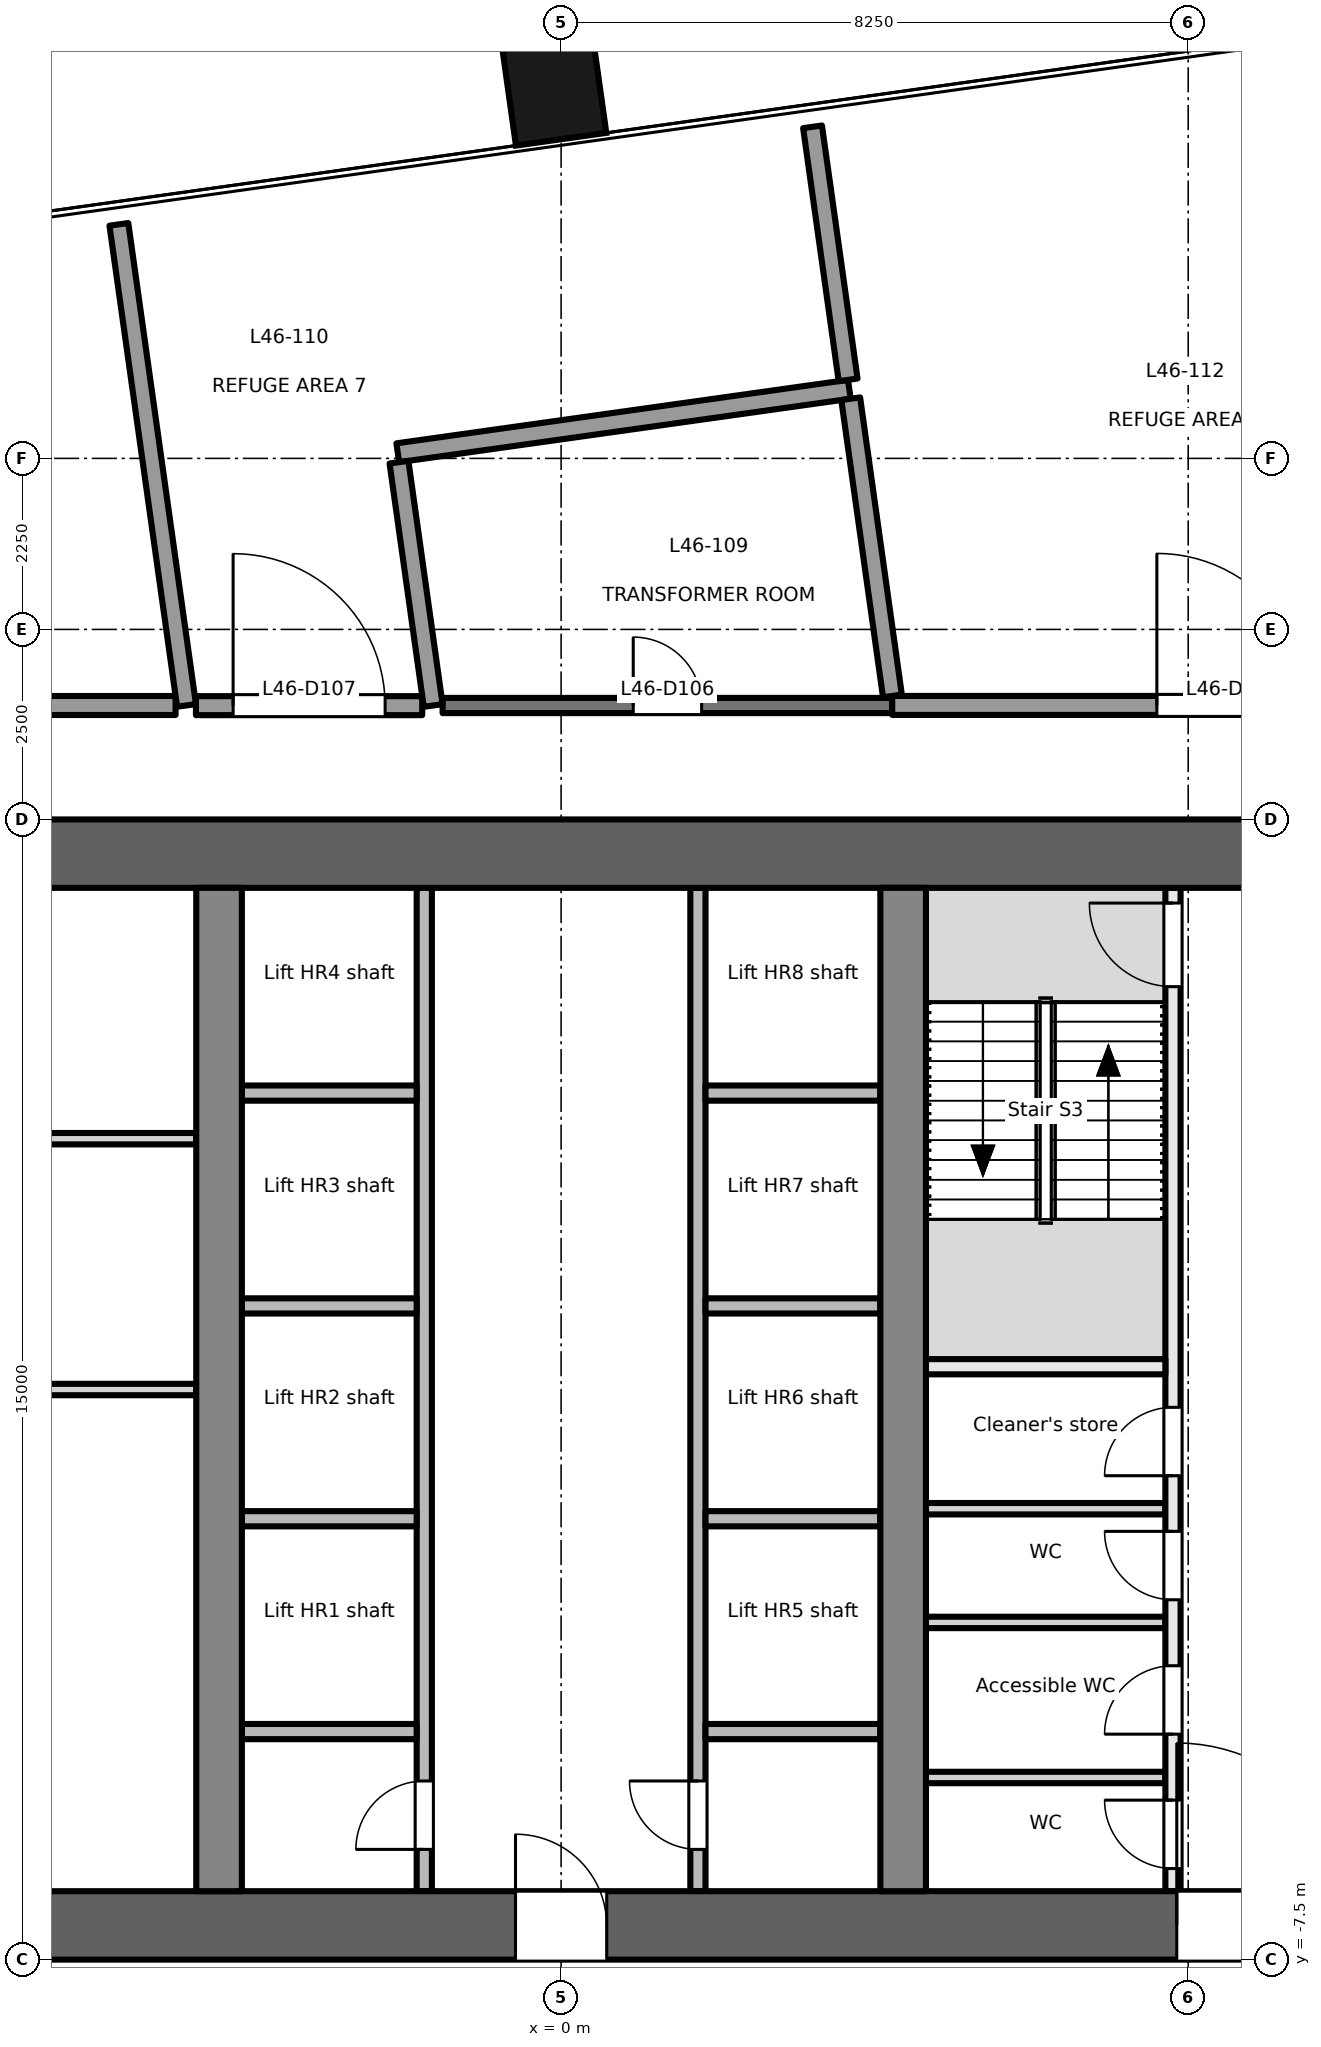
"""IFC4 building model, lengths in metres.
Left out: names, types, materials, properties, quantities, classifications, styles, units other than length and angle.
Written with IfcOpenShell. Run it as: python <this file> out.ifc"""

import sys

from ifc_helpers import new_model, si_unit, direction, frame, frame_2d, origin, origin_2d, place, context, subcontext, project, spatial, rectangle, extrude, element, fill, save


model = new_model("IFC4")
c1 = context("Model", 3, precision=1e-05, world=origin(), true_north=direction((0.0, 1.0)))
c2 = subcontext(c1, "Body", "Model", "MODEL_VIEW")
j1 = project(units=[si_unit("LENGTHUNIT", "METRE"), si_unit("PLANEANGLEUNIT", "RADIAN")], contexts=[c1])
p1 = place(None, origin())
s1 = spatial("IfcSite", under=j1, at=p1, CompositionType="ELEMENT")
p2 = place(p1, origin())
s2 = spatial("IfcBuilding", under=s1, at=p2, CompositionType="ELEMENT")
p3 = place(p2, frame((0.0, 0.0, 199.7)))
s3 = spatial("IfcBuildingStorey", under=s2, at=p3, CompositionType="ELEMENT", Elevation=199.7)
p4 = place(p3, frame((-0.125, 17.34, -0.2), z_axis=(0.0, 0.0, 1.0), x_axis=(0.99027049762, 0.139155817501, 0.0)))
e1 = element("IfcColumn", 1, at=p4, inside=s3, PredefinedType="COLUMN", context=c2, shape_type="SweptSolid", body=[
    extrude(rectangle(XDim=1.2, YDim=1.8, at=origin_2d()), origin(), (0.0, 0.0, 1.0), 8.4),
])
p5 = place(p3, frame((-18.0, -7.05, -0.2), z_axis=(0.0, 0.0, 1.0), x_axis=(1.0, 0.0, 0.0)))
e2 = element("IfcWall", 2, at=p5, inside=s3, PredefinedType="SHEAR", context=c2, shape_type="SweptSolid", body=[
    extrude(rectangle(XDim=36.0, YDim=0.9, at=frame_2d((18.0, 0.0))), origin(), (0.0, 0.0, 1.0), 8.4),
])
p6 = place(p5, frame((4.9, 0.0, 0.2)))
e3 = element("IfcOpeningElement", 3, at=p6, cuts=e2, PredefinedType="OPENING", context=c2, shape_type="SweptSolid", body=[
    extrude(rectangle(XDim=1.8, YDim=2.1, at=frame_2d((0.9, 1.05))), frame((0.0, 0.46, 0.0), z_axis=(0.0, -1.0, 0.0), x_axis=(1.0, 0.0, 0.0)), (0.0, 0.0, 1.0), 0.921),
])
p7 = place(p5, frame((17.4, 0.0, 0.2)))
e4 = element("IfcOpeningElement", 4, at=p7, cuts=e2, PredefinedType="OPENING", context=c2, shape_type="SweptSolid", body=[
    extrude(rectangle(XDim=1.2, YDim=2.1, at=frame_2d((0.6, 1.05))), frame((0.0, 0.46, 0.0), z_axis=(0.0, -1.0, 0.0), x_axis=(1.0, 0.0, 0.0)), (0.0, 0.0, 1.0), 0.921),
])
p8 = place(p5, frame((26.1, 0.0, 0.2)))
e5 = element("IfcOpeningElement", 5, at=p8, cuts=e2, PredefinedType="OPENING", context=c2, shape_type="SweptSolid", body=[
    extrude(rectangle(XDim=2.4, YDim=2.1, at=frame_2d((1.2, 1.05))), frame((0.0, 0.46, 0.0), z_axis=(0.0, -1.0, 0.0), x_axis=(1.0, 0.0, 0.0)), (0.0, 0.0, 1.0), 0.921),
])
p9 = place(p3, frame((-18.0, 7.05, -0.2), z_axis=(0.0, 0.0, 1.0), x_axis=(1.0, 0.0, 0.0)))
e6 = element("IfcWall", 6, at=p9, inside=s3, PredefinedType="SHEAR", context=c2, shape_type="SweptSolid", body=[
    extrude(rectangle(XDim=36.0, YDim=0.9, at=frame_2d((18.0, 0.0))), origin(), (0.0, 0.0, 1.0), 8.4),
])
for number, where, z_axis, x_axis in (
    (7, (-4.5, -6.6, -0.2), (0.0, 0.0, 1.0), (0.0, 1.0, 0.0)),
    (8, (4.5, -6.6, -0.2), (0.0, 0.0, 1.0), (0.0, 1.0, 0.0)),
):
    element("IfcWall", number, at=place(p3, frame(where, z_axis=z_axis, x_axis=x_axis)), inside=s3, PredefinedType="SHEAR", context=c2, shape_type="SweptSolid", body=[
        extrude(rectangle(XDim=13.2, YDim=0.6, at=frame_2d((6.6, 0.0))), origin(), (0.0, 0.0, 1.0), 8.4),
    ])
for number, where, z_axis, x_axis in (
    (9, (-11.05, 0.0, 0.0), (0.0, 0.0, 1.0), (1.0, 0.0, 0.0)),
    (10, (-11.05, 3.3, 0.0), (0.0, 0.0, 1.0), (1.0, 0.0, 0.0)),
):
    element("IfcWall", number, at=place(p3, frame(where, z_axis=z_axis, x_axis=x_axis)), inside=s3, PredefinedType="PARTITIONING", context=c2, shape_type="SweptSolid", body=[
        extrude(rectangle(XDim=6.25, YDim=0.15, at=frame_2d((3.125, 0.0))), origin(), (0.0, 0.0, 1.0), 8.2),
    ])
p10 = place(p3, frame((-1.8, -6.6, 0.0), z_axis=(0.0, 0.0, 1.0), x_axis=(0.0, 1.0, 0.0)))
e11 = element("IfcWall", 11, at=p10, inside=s3, PredefinedType="PARTITIONING", context=c2, shape_type="SweptSolid", body=[
    extrude(rectangle(XDim=13.2, YDim=0.2, at=frame_2d((6.6, 0.0))), origin(), (0.0, 0.0, 1.0), 8.2),
])
p11 = place(p10, frame((0.55, 0.0, 0.0)))
e12 = element("IfcOpeningElement", 12, at=p11, cuts=e11, PredefinedType="OPENING", context=c2, shape_type="SweptSolid", body=[
    extrude(rectangle(XDim=0.9, YDim=2.1, at=frame_2d((0.45, 1.05))), frame((0.0, 0.111, 0.0), z_axis=(0.0, -1.0, 0.0), x_axis=(1.0, 0.0, 0.0)), (0.0, 0.0, 1.0), 0.221),
])
p12 = place(p3, frame((1.8, -6.6, 0.0), z_axis=(0.0, 0.0, 1.0), x_axis=(0.0, 1.0, 0.0)))
e13 = element("IfcWall", 13, at=p12, inside=s3, PredefinedType="PARTITIONING", context=c2, shape_type="SweptSolid", body=[
    extrude(rectangle(XDim=13.2, YDim=0.2, at=frame_2d((6.6, 0.0))), origin(), (0.0, 0.0, 1.0), 8.2),
])
p13 = place(p12, frame((0.55, 0.0, 0.0)))
e14 = element("IfcOpeningElement", 14, at=p13, cuts=e13, PredefinedType="OPENING", context=c2, shape_type="SweptSolid", body=[
    extrude(rectangle(XDim=0.9, YDim=2.1, at=frame_2d((0.45, 1.05))), frame((0.0, 0.111, 0.0), z_axis=(0.0, -1.0, 0.0), x_axis=(1.0, 0.0, 0.0)), (0.0, 0.0, 1.0), 0.221),
])
for number, where, z_axis, x_axis in (
    (15, (-4.2, -1.7, 0.0), (0.0, 0.0, 1.0), (1.0, 0.0, 0.0)),
    (16, (-4.2, 1.1, 0.0), (0.0, 0.0, 1.0), (1.0, 0.0, 0.0)),
    (17, (-4.2, 3.9, 0.0), (0.0, 0.0, 1.0), (1.0, 0.0, 0.0)),
    (18, (-4.2, -4.5, 0.0), (0.0, 0.0, 1.0), (1.0, 0.0, 0.0)),
    (19, (1.9, -1.7, 0.0), (0.0, 0.0, 1.0), (1.0, 0.0, 0.0)),
    (20, (1.9, 1.1, 0.0), (0.0, 0.0, 1.0), (1.0, 0.0, 0.0)),
    (21, (1.9, 3.9, 0.0), (0.0, 0.0, 1.0), (1.0, 0.0, 0.0)),
    (22, (1.9, -4.5, 0.0), (0.0, 0.0, 1.0), (1.0, 0.0, 0.0)),
):
    element("IfcWall", number, at=place(p3, frame(where, z_axis=z_axis, x_axis=x_axis)), inside=s3, PredefinedType="PARTITIONING", context=c2, shape_type="SweptSolid", body=[
        extrude(rectangle(XDim=2.3, YDim=0.2, at=frame_2d((1.15, 0.0))), origin(), (0.0, 0.0, 1.0), 8.2),
    ])
p14 = place(p3, frame((8.05, -6.6, 0.0), z_axis=(0.0, 0.0, 1.0), x_axis=(0.0, 1.0, 0.0)))
e23 = element("IfcWall", 23, at=p14, inside=s3, PredefinedType="PARTITIONING", context=c2, shape_type="SweptSolid", body=[
    extrude(rectangle(XDim=13.2, YDim=0.2, at=frame_2d((6.6, 0.0))), origin(), (0.0, 0.0, 1.0), 8.2),
])
p15 = place(p14, frame((0.298, 0.0, 0.0)))
e24 = element("IfcOpeningElement", 24, at=p15, cuts=e23, PredefinedType="OPENING", context=c2, shape_type="SweptSolid", body=[
    extrude(rectangle(XDim=0.9, YDim=2.1, at=frame_2d((0.45, 1.05))), frame((0.0, 0.111, 0.0), z_axis=(0.0, -1.0, 0.0), x_axis=(1.0, 0.0, 0.0)), (0.0, 0.0, 1.0), 0.221),
])
p16 = place(p14, frame((2.066, 0.0, 0.0)))
e25 = element("IfcOpeningElement", 25, at=p16, cuts=e23, PredefinedType="OPENING", context=c2, shape_type="SweptSolid", body=[
    extrude(rectangle(XDim=0.9, YDim=2.1, at=frame_2d((0.45, 1.05))), frame((0.0, 0.111, 0.0), z_axis=(0.0, -1.0, 0.0), x_axis=(1.0, 0.0, 0.0)), (0.0, 0.0, 1.0), 0.221),
])
p17 = place(p14, frame((3.834, 0.0, 0.0)))
e26 = element("IfcOpeningElement", 26, at=p17, cuts=e23, PredefinedType="OPENING", context=c2, shape_type="SweptSolid", body=[
    extrude(rectangle(XDim=0.9, YDim=2.1, at=frame_2d((0.45, 1.05))), frame((0.0, 0.111, 0.0), z_axis=(0.0, -1.0, 0.0), x_axis=(1.0, 0.0, 0.0)), (0.0, 0.0, 1.0), 0.221),
])
p18 = place(p14, frame((5.466, 0.0, 0.0)))
e27 = element("IfcOpeningElement", 27, at=p18, cuts=e23, PredefinedType="OPENING", context=c2, shape_type="SweptSolid", body=[
    extrude(rectangle(XDim=0.9, YDim=2.1, at=frame_2d((0.45, 1.05))), frame((0.0, 0.111, 0.0), z_axis=(0.0, -1.0, 0.0), x_axis=(1.0, 0.0, 0.0)), (0.0, 0.0, 1.0), 0.221),
])
p19 = place(p14, frame((11.9, 0.0, 0.0)))
e28 = element("IfcOpeningElement", 28, at=p19, cuts=e23, PredefinedType="OPENING", context=c2, shape_type="SweptSolid", body=[
    extrude(rectangle(XDim=1.1, YDim=2.1, at=frame_2d((0.55, 1.05))), frame((0.0, 0.111, 0.0), z_axis=(0.0, -1.0, 0.0), x_axis=(1.0, 0.0, 0.0)), (0.0, 0.0, 1.0), 0.221),
])
p20 = place(p3, frame((4.8, 0.3, 0.0), z_axis=(0.0, 0.0, 1.0), x_axis=(1.0, 0.0, 0.0)))
e29 = element("IfcWall", 29, at=p20, inside=s3, PredefinedType="PARTITIONING", context=c2, shape_type="SweptSolid", body=[
    extrude(rectangle(XDim=3.15, YDim=0.2, at=frame_2d((1.575, 0.0))), origin(), (0.0, 0.0, 1.0), 8.2),
])
for number, where, z_axis, x_axis in (
    (30, (4.8, -5.104, 0.0), (0.0, 0.0, 1.0), (1.0, 0.0, 0.0)),
    (31, (4.8, -3.064, 0.0), (0.0, 0.0, 1.0), (1.0, 0.0, 0.0)),
    (32, (4.8, -1.568, 0.0), (0.0, 0.0, 1.0), (1.0, 0.0, 0.0)),
):
    element("IfcWall", number, at=place(p3, frame(where, z_axis=z_axis, x_axis=x_axis)), inside=s3, PredefinedType="PARTITIONING", context=c2, shape_type="SweptSolid", body=[
        extrude(rectangle(XDim=3.15, YDim=0.15, at=frame_2d((1.575, 0.0))), origin(), (0.0, 0.0, 1.0), 8.2),
    ])
p21 = place(p3, frame((-11.112, 8.999, 0.0), z_axis=(0.0, 0.0, 1.0), x_axis=(1.0, 0.0, 0.0)))
e33 = element("IfcWall", 33, at=p21, inside=s3, PredefinedType="PARTITIONING", context=c2, shape_type="SweptSolid", body=[
    extrude(rectangle(XDim=6.04, YDim=0.25, at=frame_2d((3.02, 0.0))), origin(), (0.0, 0.0, 1.0), 7.9),
])
p22 = place(p21, frame((2.02, 0.0, 0.0)))
e34 = element("IfcOpeningElement", 34, at=p22, cuts=e33, PredefinedType="OPENING", context=c2, shape_type="SweptSolid", body=[
    extrude(rectangle(XDim=2.0, YDim=2.1, at=frame_2d((1.0, 1.05))), frame((0.0, 0.135, 0.0), z_axis=(0.0, -1.0, 0.0), x_axis=(1.0, 0.0, 0.0)), (0.0, 0.0, 1.0), 0.271),
])
p23 = place(p3, frame((-1.559, 8.999, 0.0), z_axis=(0.0, 0.0, 1.0), x_axis=(1.0, 0.0, 0.0)))
e35 = element("IfcWall", 35, at=p23, inside=s3, PredefinedType="PARTITIONING", context=c2, shape_type="SweptSolid", body=[
    extrude(rectangle(XDim=5.915, YDim=0.2, at=frame_2d((2.958, 0.0))), origin(), (0.0, 0.0, 1.0), 7.9),
])
p24 = place(p23, frame((2.508, 0.0, 0.0)))
e36 = element("IfcOpeningElement", 36, at=p24, cuts=e35, PredefinedType="OPENING", context=c2, shape_type="SweptSolid", body=[
    extrude(rectangle(XDim=0.9, YDim=2.1, at=frame_2d((0.45, 1.05))), frame((0.0, 0.111, 0.0), z_axis=(0.0, -1.0, 0.0), x_axis=(1.0, 0.0, 0.0)), (0.0, 0.0, 1.0), 0.221),
])
p25 = place(p3, frame((-4.804, 8.997, 0.0), z_axis=(0.0, 0.0, 1.0), x_axis=(1.0, 0.0, 0.0)))
e37 = element("IfcWall", 37, at=p25, inside=s3, PredefinedType="PARTITIONING", context=c2, shape_type="SweptSolid", body=[
    extrude(rectangle(XDim=2.977, YDim=0.25, at=frame_2d((1.489, 0.0))), origin(), (0.0, 0.0, 1.0), 7.9),
])
p26 = place(p25, frame((0.489, 0.0, 0.0)))
e38 = element("IfcOpeningElement", 38, at=p26, cuts=e37, PredefinedType="OPENING", context=c2, shape_type="SweptSolid", body=[
    extrude(rectangle(XDim=2.0, YDim=2.1, at=frame_2d((1.0, 1.05))), frame((0.0, 0.135, 0.0), z_axis=(0.0, -1.0, 0.0), x_axis=(1.0, 0.0, 0.0)), (0.0, 0.0, 1.0), 0.271),
])
p27 = place(p3, frame((4.356, 9.0, 0.0), z_axis=(0.0, 0.0, 1.0), x_axis=(1.0, 0.0, 0.0)))
e39 = element("IfcWall", 39, at=p27, inside=s3, PredefinedType="PARTITIONING", context=c2, shape_type="SweptSolid", body=[
    extrude(rectangle(XDim=8.965, YDim=0.25, at=frame_2d((4.482, 0.0))), origin(), (0.0, 0.0, 1.0), 7.84),
])
p28 = place(p27, frame((3.482, 0.0, 0.0)))
e40 = element("IfcOpeningElement", 40, at=p28, cuts=e39, PredefinedType="OPENING", context=c2, shape_type="SweptSolid", body=[
    extrude(rectangle(XDim=2.0, YDim=2.1, at=frame_2d((1.0, 1.05))), frame((0.0, 0.135, 0.0), z_axis=(0.0, -1.0, 0.0), x_axis=(1.0, 0.0, 0.0)), (0.0, 0.0, 1.0), 0.271),
])
p29 = place(p3, frame((-5.818, 15.329, 0.0), z_axis=(0.0, 0.0, 1.0), x_axis=(0.139271219089, -0.990254274181, 0.0)))
e41 = element("IfcWall", 41, at=p29, inside=s3, PredefinedType="PARTITIONING", context=c2, shape_type="SweptSolid", body=[
    extrude(rectangle(XDim=6.391, YDim=0.25, at=frame_2d((3.196, 0.0))), origin(), (0.0, 0.0, 1.0), 7.1),
])
p30 = place(p3, frame((-2.149, 12.324, 0.0), z_axis=(0.0, 0.0, 1.0), x_axis=(0.990267623823, 0.139176266683, 0.0)))
e42 = element("IfcWall", 42, at=p30, inside=s3, PredefinedType="PARTITIONING", context=c2, shape_type="SweptSolid", body=[
    extrude(rectangle(XDim=5.999, YDim=0.25, at=frame_2d((3.0, 0.0))), origin(), (0.0, 0.0, 1.0), 6.15),
])
p31 = place(p3, frame((-1.683, 8.999, 0.0), z_axis=(0.0, 0.0, 1.0), x_axis=(-0.13920043999, 0.990264226107, 0.0)))
e43 = element("IfcWall", 43, at=p31, inside=s3, PredefinedType="PARTITIONING", context=c2, shape_type="SweptSolid", body=[
    extrude(rectangle(XDim=3.232, YDim=0.25, at=frame_2d((1.616, 0.0))), origin(), (0.0, 0.0, 1.0), 7.1),
])
p32 = place(p3, frame((3.81, 13.035, 0.0), z_axis=(0.0, 0.0, 1.0), x_axis=(0.139005650311, -0.990291587959, 0.0)))
e44 = element("IfcWall", 44, at=p32, inside=s3, PredefinedType="PARTITIONING", context=c2, shape_type="SweptSolid", body=[
    extrude(rectangle(XDim=3.948, YDim=0.25, at=frame_2d((1.974, 0.0))), origin(), (0.0, 0.0, 1.0), 7.1),
])
p33 = place(p3, frame((3.308, 16.612, 0.0), z_axis=(0.0, 0.0, 1.0), x_axis=(0.139143559235, -0.990272220111, 0.0)))
e45 = element("IfcWall", 45, at=p33, inside=s3, PredefinedType="PARTITIONING", context=c2, shape_type="SweptSolid", body=[
    extrude(rectangle(XDim=3.362, YDim=0.25, at=frame_2d((1.681, 0.0))), origin(), (0.0, 0.0, 1.0), 8.2),
])
p34 = place(p11, origin())
e46 = element("IfcDoor", 46, at=p34, inside=s3, OperationType="SINGLE_SWING_LEFT", PredefinedType="DOOR", context=c2, shape_type="SweptSolid", body=[
    extrude(rectangle(XDim=0.9, YDim=2.1, at=frame_2d((0.45, 1.05))), frame((0.0, 0.025, 0.0), z_axis=(0.0, -1.0, 0.0), x_axis=(1.0, 0.0, 0.0)), (0.0, 0.0, 1.0), 0.05),
])
fill(e12, e46)
p35 = place(p13, origin())
e47 = element("IfcDoor", 47, at=p35, inside=s3, OperationType="SINGLE_SWING_RIGHT", PredefinedType="DOOR", context=c2, shape_type="SweptSolid", body=[
    extrude(rectangle(XDim=0.9, YDim=2.1, at=frame_2d((0.45, 1.05))), frame((0.0, 0.025, 0.0), z_axis=(0.0, -1.0, 0.0), x_axis=(1.0, 0.0, 0.0)), (0.0, 0.0, 1.0), 0.05),
])
fill(e14, e47)
p36 = place(p7, origin())
e48 = element("IfcDoor", 48, at=p36, inside=s3, OperationType="SINGLE_SWING_LEFT", PredefinedType="DOOR", context=c2, shape_type="SweptSolid", body=[
    extrude(rectangle(XDim=1.2, YDim=2.1, at=frame_2d((0.6, 1.05))), frame((0.0, 0.025, 0.0), z_axis=(0.0, -1.0, 0.0), x_axis=(1.0, 0.0, 0.0)), (0.0, 0.0, 1.0), 0.05),
])
fill(e4, e48)
p37 = place(p15, origin())
e49 = element("IfcDoor", 49, at=p37, inside=s3, OperationType="SINGLE_SWING_RIGHT", PredefinedType="DOOR", context=c2, shape_type="SweptSolid", body=[
    extrude(rectangle(XDim=0.9, YDim=2.1, at=frame_2d((0.45, 1.05))), frame((0.0, 0.025, 0.0), z_axis=(0.0, -1.0, 0.0), x_axis=(1.0, 0.0, 0.0)), (0.0, 0.0, 1.0), 0.05),
])
fill(e24, e49)
p38 = place(p16, origin())
e50 = element("IfcDoor", 50, at=p38, inside=s3, OperationType="SINGLE_SWING_LEFT", PredefinedType="DOOR", context=c2, shape_type="SweptSolid", body=[
    extrude(rectangle(XDim=0.9, YDim=2.1, at=frame_2d((0.45, 1.05))), frame((0.0, 0.025, 0.0), z_axis=(0.0, -1.0, 0.0), x_axis=(1.0, 0.0, 0.0)), (0.0, 0.0, 1.0), 0.05),
])
fill(e25, e50)
p39 = place(p17, origin())
e51 = element("IfcDoor", 51, at=p39, inside=s3, OperationType="SINGLE_SWING_RIGHT", PredefinedType="DOOR", context=c2, shape_type="SweptSolid", body=[
    extrude(rectangle(XDim=0.9, YDim=2.1, at=frame_2d((0.45, 1.05))), frame((0.0, 0.025, 0.0), z_axis=(0.0, -1.0, 0.0), x_axis=(1.0, 0.0, 0.0)), (0.0, 0.0, 1.0), 0.05),
])
fill(e26, e51)
p40 = place(p18, origin())
e52 = element("IfcDoor", 52, at=p40, inside=s3, OperationType="SINGLE_SWING_LEFT", PredefinedType="DOOR", context=c2, shape_type="SweptSolid", body=[
    extrude(rectangle(XDim=0.9, YDim=2.1, at=frame_2d((0.45, 1.05))), frame((0.0, 0.025, 0.0), z_axis=(0.0, -1.0, 0.0), x_axis=(1.0, 0.0, 0.0)), (0.0, 0.0, 1.0), 0.05),
])
fill(e27, e52)
p41 = place(p19, origin())
e53 = element("IfcDoor", 53, at=p41, inside=s3, OperationType="SINGLE_SWING_RIGHT", PredefinedType="DOOR", context=c2, shape_type="SweptSolid", body=[
    extrude(rectangle(XDim=1.1, YDim=2.1, at=frame_2d((0.55, 1.05))), frame((0.0, 0.025, 0.0), z_axis=(0.0, -1.0, 0.0), x_axis=(1.0, 0.0, 0.0)), (0.0, 0.0, 1.0), 0.05),
])
fill(e28, e53)
p42 = place(p8, origin())
e54 = element("IfcDoor", 54, at=p42, inside=s3, OperationType="DOUBLE_DOOR_DOUBLE_SWING", PredefinedType="DOOR", context=c2, shape_type="SweptSolid", body=[
    extrude(rectangle(XDim=2.4, YDim=2.1, at=frame_2d((1.2, 1.05))), frame((0.0, 0.025, 0.0), z_axis=(0.0, -1.0, 0.0), x_axis=(1.0, 0.0, 0.0)), (0.0, 0.0, 1.0), 0.05),
])
fill(e5, e54)
p43 = place(p24, origin())
e55 = element("IfcDoor", 55, at=p43, inside=s3, OperationType="SINGLE_SWING_LEFT", PredefinedType="DOOR", context=c2, shape_type="SweptSolid", body=[
    extrude(rectangle(XDim=0.9, YDim=2.1, at=frame_2d((0.45, 1.05))), frame((0.0, 0.025, 0.0), z_axis=(0.0, -1.0, 0.0), x_axis=(1.0, 0.0, 0.0)), (0.0, 0.0, 1.0), 0.05),
])
fill(e36, e55)
p44 = place(p26, origin())
e56 = element("IfcDoor", 56, at=p44, inside=s3, OperationType="DOUBLE_DOOR_SINGLE_SWING", PredefinedType="DOOR", context=c2, shape_type="SweptSolid", body=[
    extrude(rectangle(XDim=2.0, YDim=2.1, at=frame_2d((1.0, 1.05))), frame((0.0, 0.025, 0.0), z_axis=(0.0, -1.0, 0.0), x_axis=(1.0, 0.0, 0.0)), (0.0, 0.0, 1.0), 0.05),
])
fill(e38, e56)
p45 = place(p28, origin())
e57 = element("IfcDoor", 57, at=p45, inside=s3, OperationType="DOUBLE_DOOR_SINGLE_SWING", PredefinedType="DOOR", context=c2, shape_type="SweptSolid", body=[
    extrude(rectangle(XDim=2.0, YDim=2.1, at=frame_2d((1.0, 1.05))), frame((0.0, 0.025, 0.0), z_axis=(0.0, -1.0, 0.0), x_axis=(1.0, 0.0, 0.0)), (0.0, 0.0, 1.0), 0.05),
])
fill(e40, e57)
save(model, sys.argv[1])
